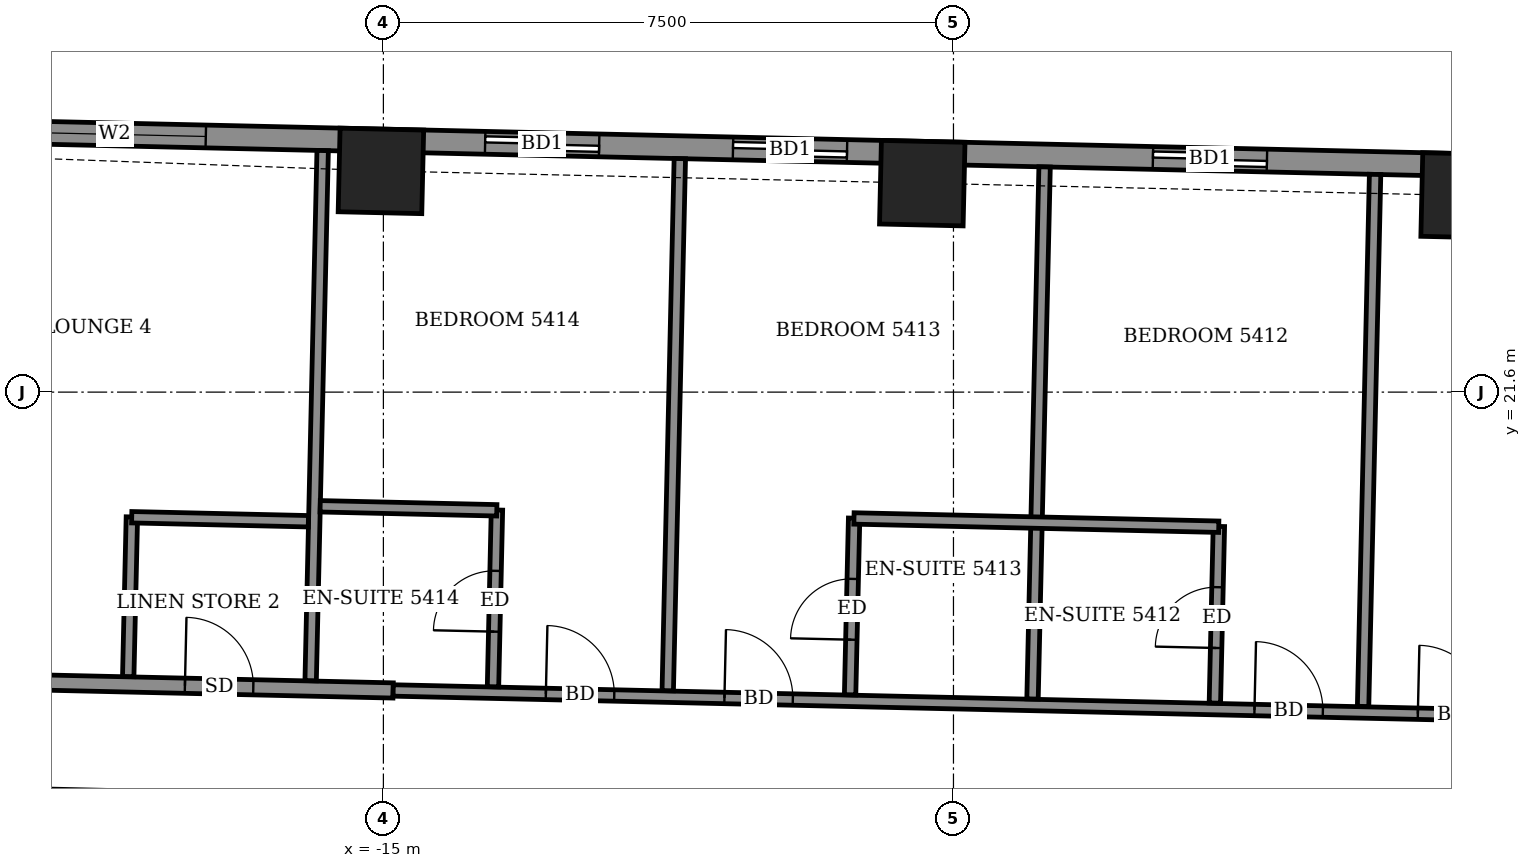
"""IFC4 building model, lengths in metres.
Left out: names, types, materials, properties, quantities, classifications, styles, units other than length and angle.
Written with IfcOpenShell. Run it as: python <this file> out.ifc"""

import sys

from ifc_helpers import new_model, si_unit, direction, frame, frame_2d, origin, origin_2d, place, context, subcontext, project, spatial, rectangle, extrude, element, fill, save


model = new_model("IFC4")
c1 = context("Model", 3, precision=1e-05, world=origin(), true_north=direction((0.0, 1.0)))
c2 = subcontext(c1, "Body", "Model", "MODEL_VIEW")
j1 = project(units=[si_unit("LENGTHUNIT", "METRE"), si_unit("PLANEANGLEUNIT", "RADIAN")], contexts=[c1])
p1 = place(None, origin())
s1 = spatial("IfcSite", under=j1, at=p1, CompositionType="ELEMENT")
p2 = place(p1, origin())
s2 = spatial("IfcBuilding", under=s1, at=p2, CompositionType="ELEMENT")
p3 = place(p2, frame((0.0, 0.0, 212.3)))
s3 = spatial("IfcBuildingStorey", under=s2, at=p3, CompositionType="ELEMENT", Elevation=212.3)
for number, where, z_axis, x_axis in (
    (1, (-0.789, 24.187, -0.55), (0.0, 0.0, 1.0), (-1.0, 0.023, 0.0)),
    (2, (-7.91, 24.349, -0.55), (0.0, 0.0, 1.0), (-1.0, 0.023, 0.0)),
    (3, (-15.032, 24.51, -0.55), (0.0, 0.0, 1.0), (-1.0, 0.023, 0.0)),
):
    element("IfcColumn", number, at=place(p3, frame(where, z_axis=z_axis, x_axis=x_axis)), inside=s3, PredefinedType="COLUMN", context=c2, shape_type="SweptSolid", body=[
        extrude(rectangle(XDim=1.1, YDim=1.1, at=origin_2d()), origin(), (0.0, 0.0, 1.0), 3.6),
    ])
p4 = place(p3, frame((20.437, 24.106, 0.0), z_axis=(0.0, 0.0, 1.0), x_axis=(-0.999742506232, 0.022691875925, 0.0)))
e4 = element("IfcWall", 4, at=p4, inside=s3, PredefinedType="SOLIDWALL", context=c2, shape_type="SweptSolid", body=[
    extrude(rectangle(XDim=42.444, YDim=0.3, at=frame_2d((21.222, 0.0))), origin(), (0.0, 0.0, 1.0), 2.55),
])
p5 = place(p4, frame((1.563, 0.0, 0.0)))
e5 = element("IfcOpeningElement", 5, at=p5, cuts=e4, PredefinedType="OPENING", context=c2, shape_type="SweptSolid", body=[
    extrude(rectangle(XDim=1.5, YDim=2.4, at=frame_2d((0.75, 1.2))), frame((0.0, 0.16, 0.0), z_axis=(0.0, -1.0, 0.0), x_axis=(1.0, 0.0, 0.0)), (0.0, 0.0, 1.0), 0.32),
])
p6 = place(p4, frame((4.584, 0.0, 0.0)))
e6 = element("IfcOpeningElement", 6, at=p6, cuts=e4, PredefinedType="OPENING", context=c2, shape_type="SweptSolid", body=[
    extrude(rectangle(XDim=1.5, YDim=2.4, at=frame_2d((0.75, 1.2))), frame((0.0, 0.16, 0.0), z_axis=(0.0, -1.0, 0.0), x_axis=(1.0, 0.0, 0.0)), (0.0, 0.0, 1.0), 0.32),
])
p7 = place(p4, frame((10.269, 0.0, 0.0)))
e7 = element("IfcOpeningElement", 7, at=p7, cuts=e4, PredefinedType="OPENING", context=c2, shape_type="SweptSolid", body=[
    extrude(rectangle(XDim=1.5, YDim=2.4, at=frame_2d((0.75, 1.2))), frame((0.0, 0.16, 0.0), z_axis=(0.0, -1.0, 0.0), x_axis=(1.0, 0.0, 0.0)), (0.0, 0.0, 1.0), 0.32),
])
p8 = place(p4, frame((15.271, 0.0, 0.0)))
e8 = element("IfcOpeningElement", 8, at=p8, cuts=e4, PredefinedType="OPENING", context=c2, shape_type="SweptSolid", body=[
    extrude(rectangle(XDim=1.5, YDim=2.4, at=frame_2d((0.75, 1.2))), frame((0.0, 0.16, 0.0), z_axis=(0.0, -1.0, 0.0), x_axis=(1.0, 0.0, 0.0)), (0.0, 0.0, 1.0), 0.32),
])
p9 = place(p4, frame((18.533, 0.0, 0.0)))
e9 = element("IfcOpeningElement", 9, at=p9, cuts=e4, PredefinedType="OPENING", context=c2, shape_type="SweptSolid", body=[
    extrude(rectangle(XDim=1.5, YDim=2.4, at=frame_2d((0.75, 1.2))), frame((0.0, 0.16, 0.0), z_axis=(0.0, -1.0, 0.0), x_axis=(1.0, 0.0, 0.0)), (0.0, 0.0, 1.0), 0.32),
])
p10 = place(p4, frame((23.819, 0.0, 0.0)))
e10 = element("IfcOpeningElement", 10, at=p10, cuts=e4, PredefinedType="OPENING", context=c2, shape_type="SweptSolid", body=[
    extrude(rectangle(XDim=1.5, YDim=2.4, at=frame_2d((0.75, 1.2))), frame((0.0, 0.16, 0.0), z_axis=(0.0, -1.0, 0.0), x_axis=(1.0, 0.0, 0.0)), (0.0, 0.0, 1.0), 0.32),
])
p11 = place(p4, frame((29.345, 0.0, 0.0)))
e11 = element("IfcOpeningElement", 11, at=p11, cuts=e4, PredefinedType="OPENING", context=c2, shape_type="SweptSolid", body=[
    extrude(rectangle(XDim=1.5, YDim=2.4, at=frame_2d((0.75, 1.2))), frame((0.0, 0.16, 0.0), z_axis=(0.0, -1.0, 0.0), x_axis=(1.0, 0.0, 0.0)), (0.0, 0.0, 1.0), 0.32),
])
p12 = place(p4, frame((32.607, 0.0, 0.0)))
e12 = element("IfcOpeningElement", 12, at=p12, cuts=e4, PredefinedType="OPENING", context=c2, shape_type="SweptSolid", body=[
    extrude(rectangle(XDim=1.5, YDim=2.4, at=frame_2d((0.75, 1.2))), frame((0.0, 0.16, 0.0), z_axis=(0.0, -1.0, 0.0), x_axis=(1.0, 0.0, 0.0)), (0.0, 0.0, 1.0), 0.32),
])
p13 = place(p4, frame((37.783, 0.0, 0.9)))
e13 = element("IfcOpeningElement", 13, at=p13, cuts=e4, PredefinedType="OPENING", context=c2, shape_type="SweptSolid", body=[
    extrude(rectangle(XDim=2.4, YDim=1.5, at=frame_2d((1.2, 0.75))), frame((0.0, 0.16, 0.0), z_axis=(0.0, -1.0, 0.0), x_axis=(1.0, 0.0, 0.0)), (0.0, 0.0, 1.0), 0.32),
])
p14 = place(p3, frame((-25.743, 16.422, 0.0), z_axis=(0.0, 0.0, 1.0), x_axis=(0.999741076645, -0.022754772455, 0.0)))
e14 = element("IfcWall", 14, at=p14, inside=s3, PredefinedType="PARTITIONING", context=c2, shape_type="SweptSolid", body=[
    extrude(rectangle(XDim=9.141, YDim=0.2, at=frame_2d((4.571, 0.0))), origin(), (0.0, 0.0, 1.0), 3.05),
])
p15 = place(p14, frame((3.371, 0.0, 0.0)))
e15 = element("IfcOpeningElement", 15, at=p15, cuts=e14, PredefinedType="OPENING", context=c2, shape_type="SweptSolid", body=[
    extrude(rectangle(XDim=1.0, YDim=2.1, at=frame_2d((0.5, 1.05))), frame((0.0, 0.11, 0.0), z_axis=(0.0, -1.0, 0.0), x_axis=(1.0, 0.0, 0.0)), (0.0, 0.0, 1.0), 0.22),
])
p16 = place(p3, frame((-25.709, 17.921, 0.0), z_axis=(0.0, 0.0, 1.0), x_axis=(0.999742764922, -0.022680475901, 0.0)))
e16 = element("IfcWall", 16, at=p16, inside=s3, PredefinedType="PARTITIONING", context=c2, shape_type="SweptSolid", body=[
    extrude(rectangle(XDim=10.84, YDim=0.2, at=frame_2d((5.42, 0.0))), origin(), (0.0, 0.0, 1.0), 3.05),
])
p17 = place(p16, frame((2.475, 0.0, 0.0)))
e17 = element("IfcOpeningElement", 17, at=p17, cuts=e16, PredefinedType="OPENING", context=c2, shape_type="SweptSolid", body=[
    extrude(rectangle(XDim=1.0, YDim=2.1, at=frame_2d((0.5, 1.05))), frame((0.0, 0.11, 0.0), z_axis=(0.0, -1.0, 0.0), x_axis=(1.0, 0.0, 0.0)), (0.0, 0.0, 1.0), 0.22),
])
p18 = place(p16, frame((8.1, 0.0, 0.0)))
e18 = element("IfcOpeningElement", 18, at=p18, cuts=e16, PredefinedType="OPENING", context=c2, shape_type="SweptSolid", body=[
    extrude(rectangle(XDim=0.9, YDim=2.1, at=frame_2d((0.45, 1.05))), frame((0.0, 0.11, 0.0), z_axis=(0.0, -1.0, 0.0), x_axis=(1.0, 0.0, 0.0)), (0.0, 0.0, 1.0), 0.22),
])
p19 = place(p3, frame((-14.871, 17.675, 0.0), z_axis=(0.0, 0.0, 1.0), x_axis=(0.999742359486, -0.02269834024, 0.0)))
e19 = element("IfcWall", 19, at=p19, inside=s3, PredefinedType="PARTITIONING", context=c2, shape_type="SweptSolid", body=[
    extrude(rectangle(XDim=30.536, YDim=0.15, at=frame_2d((15.268, 0.0))), origin(), (0.0, 0.0, 1.0), 3.05),
])
p20 = place(p19, frame((29.436, 0.0, 0.0)))
e20 = element("IfcOpeningElement", 20, at=p20, cuts=e19, PredefinedType="OPENING", context=c2, shape_type="SweptSolid", body=[
    extrude(rectangle(XDim=0.9, YDim=2.1, at=frame_2d((0.45, 1.05))), frame((0.0, 0.085, 0.0), z_axis=(0.0, -1.0, 0.0), x_axis=(1.0, 0.0, 0.0)), (0.0, 0.0, 1.0), 0.17),
])
p21 = place(p19, frame((22.484, 0.0, 0.0)))
e21 = element("IfcOpeningElement", 21, at=p21, cuts=e19, PredefinedType="OPENING", context=c2, shape_type="SweptSolid", body=[
    extrude(rectangle(XDim=0.9, YDim=2.1, at=frame_2d((0.45, 1.05))), frame((0.0, 0.085, 0.0), z_axis=(0.0, -1.0, 0.0), x_axis=(1.0, 0.0, 0.0)), (0.0, 0.0, 1.0), 0.17),
])
p22 = place(p19, frame((20.434, 0.0, 0.0)))
e22 = element("IfcOpeningElement", 22, at=p22, cuts=e19, PredefinedType="OPENING", context=c2, shape_type="SweptSolid", body=[
    extrude(rectangle(XDim=0.9, YDim=2.1, at=frame_2d((0.45, 1.05))), frame((0.0, 0.085, 0.0), z_axis=(0.0, -1.0, 0.0), x_axis=(1.0, 0.0, 0.0)), (0.0, 0.0, 1.0), 0.17),
])
p23 = place(p19, frame((13.484, 0.0, 0.0)))
e23 = element("IfcOpeningElement", 23, at=p23, cuts=e19, PredefinedType="OPENING", context=c2, shape_type="SweptSolid", body=[
    extrude(rectangle(XDim=0.9, YDim=2.1, at=frame_2d((0.45, 1.05))), frame((0.0, 0.085, 0.0), z_axis=(0.0, -1.0, 0.0), x_axis=(1.0, 0.0, 0.0)), (0.0, 0.0, 1.0), 0.17),
])
p24 = place(p19, frame((11.334, 0.0, 0.0)))
e24 = element("IfcOpeningElement", 24, at=p24, cuts=e19, PredefinedType="OPENING", context=c2, shape_type="SweptSolid", body=[
    extrude(rectangle(XDim=0.9, YDim=2.1, at=frame_2d((0.45, 1.05))), frame((0.0, 0.085, 0.0), z_axis=(0.0, -1.0, 0.0), x_axis=(1.0, 0.0, 0.0)), (0.0, 0.0, 1.0), 0.17),
])
p25 = place(p19, frame((4.359, 0.0, 0.0)))
e25 = element("IfcOpeningElement", 25, at=p25, cuts=e19, PredefinedType="OPENING", context=c2, shape_type="SweptSolid", body=[
    extrude(rectangle(XDim=0.9, YDim=2.1, at=frame_2d((0.45, 1.05))), frame((0.0, 0.085, 0.0), z_axis=(0.0, -1.0, 0.0), x_axis=(1.0, 0.0, 0.0)), (0.0, 0.0, 1.0), 0.17),
])
p26 = place(p19, frame((2.009, 0.0, 0.0)))
e26 = element("IfcOpeningElement", 26, at=p26, cuts=e19, PredefinedType="OPENING", context=c2, shape_type="SweptSolid", body=[
    extrude(rectangle(XDim=0.9, YDim=2.1, at=frame_2d((0.45, 1.05))), frame((0.0, 0.085, 0.0), z_axis=(0.0, -1.0, 0.0), x_axis=(1.0, 0.0, 0.0)), (0.0, 0.0, 1.0), 0.17),
])
p27 = place(p3, frame((-18.357, 17.858, 0.0), z_axis=(0.0, 0.0, 1.0), x_axis=(0.022779486249, 0.999740513837, 0.0)))
e27 = element("IfcWall", 27, at=p27, inside=s3, PredefinedType="PARTITIONING", context=c2, shape_type="SweptSolid", body=[
    extrude(rectangle(XDim=2.101, YDim=0.15, at=frame_2d((1.05, 0.0))), origin(), (0.0, 0.0, 1.0), 3.05),
])
p28 = place(p3, frame((-15.957, 17.804, 0.0), z_axis=(0.0, 0.0, 1.0), x_axis=(0.022643496158, 0.999743603171, 0.0)))
e28 = element("IfcWall", 28, at=p28, inside=s3, PredefinedType="PARTITIONING", context=c2, shape_type="SweptSolid", body=[
    extrude(rectangle(XDim=6.976, YDim=0.15, at=frame_2d((3.488, 0.0))), origin(), (0.0, 0.0, 1.0), 2.55),
])
p29 = place(p3, frame((-13.558, 17.724, 0.0), z_axis=(0.0, 0.0, 1.0), x_axis=(0.022361308448, 0.999749954681, 0.0)))
e29 = element("IfcWall", 29, at=p29, inside=s3, PredefinedType="PARTITIONING", context=c2, shape_type="SweptSolid", body=[
    extrude(rectangle(XDim=2.325, YDim=0.15, at=frame_2d((1.163, 0.0))), origin(), (0.0, 0.0, 1.0), 3.05),
])
p30 = place(p29, frame((0.725, 0.0, 0.0)))
e30 = element("IfcOpeningElement", 30, at=p30, cuts=e29, PredefinedType="OPENING", context=c2, shape_type="SweptSolid", body=[
    extrude(rectangle(XDim=0.8, YDim=2.1, at=frame_2d((0.4, 1.05))), frame((0.0, 0.085, 0.0), z_axis=(0.0, -1.0, 0.0), x_axis=(1.0, 0.0, 0.0)), (0.0, 0.0, 1.0), 0.17),
])
p31 = place(p3, frame((-11.259, 17.672, 0.0), z_axis=(0.0, 0.0, 1.0), x_axis=(0.022699227919, 0.999742339331, 0.0)))
e31 = element("IfcWall", 31, at=p31, inside=s3, PredefinedType="PARTITIONING", context=c2, shape_type="SweptSolid", body=[
    extrude(rectangle(XDim=7.002, YDim=0.15, at=frame_2d((3.501, 0.0))), origin(), (0.0, 0.0, 1.0), 2.5),
])
p32 = place(p3, frame((-8.86, 17.618, 0.0), z_axis=(0.0, 0.0, 1.0), x_axis=(0.022895561926, 0.999737862264, 0.0)))
e32 = element("IfcWall", 32, at=p32, inside=s3, PredefinedType="PARTITIONING", context=c2, shape_type="SweptSolid", body=[
    extrude(rectangle(XDim=2.324, YDim=0.15, at=frame_2d((1.162, 0.0))), origin(), (0.0, 0.0, 1.0), 3.05),
])
p33 = place(p32, frame((0.725, 0.0, 0.0)))
e33 = element("IfcOpeningElement", 33, at=p33, cuts=e32, PredefinedType="OPENING", context=c2, shape_type="SweptSolid", body=[
    extrude(rectangle(XDim=0.8, YDim=2.1, at=frame_2d((0.4, 1.05))), frame((0.0, 0.085, 0.0), z_axis=(0.0, -1.0, 0.0), x_axis=(1.0, 0.0, 0.0)), (0.0, 0.0, 1.0), 0.17),
])
p34 = place(p3, frame((-6.46, 17.563, 0.0), z_axis=(0.0, 0.0, 1.0), x_axis=(0.022699227919, 0.999742339331, 0.0)))
e34 = element("IfcWall", 34, at=p34, inside=s3, PredefinedType="PARTITIONING", context=c2, shape_type="SweptSolid", body=[
    extrude(rectangle(XDim=7.002, YDim=0.15, at=frame_2d((3.501, 0.0))), origin(), (0.0, 0.0, 1.0), 2.5),
])
p35 = place(p3, frame((-4.061, 17.509, 0.0), z_axis=(0.0, 0.0, 1.0), x_axis=(0.02279059109, 0.999740260747, 0.0)))
e35 = element("IfcWall", 35, at=p35, inside=s3, PredefinedType="PARTITIONING", context=c2, shape_type="SweptSolid", body=[
    extrude(rectangle(XDim=2.324, YDim=0.15, at=frame_2d((1.162, 0.0))), origin(), (0.0, 0.0, 1.0), 3.05),
])
p36 = place(p35, frame((0.725, 0.0, 0.0)))
e36 = element("IfcOpeningElement", 36, at=p36, cuts=e35, PredefinedType="OPENING", context=c2, shape_type="SweptSolid", body=[
    extrude(rectangle(XDim=0.8, YDim=2.1, at=frame_2d((0.4, 1.05))), frame((0.0, 0.085, 0.0), z_axis=(0.0, -1.0, 0.0), x_axis=(1.0, 0.0, 0.0)), (0.0, 0.0, 1.0), 0.17),
])
p37 = place(p3, frame((-2.111, 17.465, 0.0), z_axis=(0.0, 0.0, 1.0), x_axis=(0.022597827698, 0.999744636486, 0.0)))
e37 = element("IfcWall", 37, at=p37, inside=s3, PredefinedType="PARTITIONING", context=c2, shape_type="SweptSolid", body=[
    extrude(rectangle(XDim=7.001, YDim=0.15, at=frame_2d((3.5, 0.0))), origin(), (0.0, 0.0, 1.0), 2.5),
])
for number, where, z_axis, x_axis in (
    (38, (-18.311, 19.954, 0.0), (0.0, 0.0, 1.0), (1.0, -0.023, 0.0)),
    (39, (-15.832, 20.098, 0.0), (0.0, 0.0, 1.0), (1.0, -0.023, 0.0)),
):
    element("IfcWall", number, at=place(p3, frame(where, z_axis=z_axis, x_axis=x_axis)), inside=s3, PredefinedType="PARTITIONING", context=c2, shape_type="SweptSolid", body=[
        extrude(rectangle(XDim=2.324, YDim=0.15, at=frame_2d((1.162, 0.0))), origin(), (0.0, 0.0, 1.0), 3.05),
    ])
p38 = place(p3, frame((-8.809, 19.938, 0.0), z_axis=(0.0, 0.0, 1.0), x_axis=(0.999742701292, -0.022683280499, 0.0)))
e40 = element("IfcWall", 40, at=p38, inside=s3, PredefinedType="PARTITIONING", context=c2, shape_type="SweptSolid", body=[
    extrude(rectangle(XDim=4.8, YDim=0.15, at=frame_2d((2.4, 0.0))), origin(), (0.0, 0.0, 1.0), 3.05),
])
p39 = place(p10, origin())
e41 = element("IfcDoor", 41, at=p39, inside=s3, OperationType="SLIDING_TO_LEFT", PredefinedType="DOOR", context=c2, shape_type="SweptSolid", body=[
    extrude(rectangle(XDim=1.5, YDim=2.4, at=frame_2d((0.75, 1.2))), frame((0.0, 0.025, 0.0), z_axis=(0.0, -1.0, 0.0), x_axis=(1.0, 0.0, 0.0)), (0.0, 0.0, 1.0), 0.05),
])
fill(e10, e41)
p40 = place(p11, origin())
e42 = element("IfcDoor", 42, at=p40, inside=s3, OperationType="SLIDING_TO_LEFT", PredefinedType="DOOR", context=c2, shape_type="SweptSolid", body=[
    extrude(rectangle(XDim=1.5, YDim=2.4, at=frame_2d((0.75, 1.2))), frame((0.0, 0.025, 0.0), z_axis=(0.0, -1.0, 0.0), x_axis=(1.0, 0.0, 0.0)), (0.0, 0.0, 1.0), 0.05),
])
fill(e11, e42)
p41 = place(p12, origin())
e43 = element("IfcDoor", 43, at=p41, inside=s3, OperationType="SLIDING_TO_LEFT", PredefinedType="DOOR", context=c2, shape_type="SweptSolid", body=[
    extrude(rectangle(XDim=1.5, YDim=2.4, at=frame_2d((0.75, 1.2))), frame((0.0, 0.025, 0.0), z_axis=(0.0, -1.0, 0.0), x_axis=(1.0, 0.0, 0.0)), (0.0, 0.0, 1.0), 0.05),
])
fill(e12, e43)
p42 = place(p13, origin())
e44 = element("IfcWindow", 44, at=p42, inside=s3, PartitioningType="DOUBLE_PANEL_VERTICAL", PredefinedType="WINDOW", context=c2, shape_type="SweptSolid", body=[
    extrude(rectangle(XDim=2.4, YDim=1.5, at=frame_2d((1.2, 0.75))), frame((0.0, 0.03, 0.0), z_axis=(0.0, -1.0, 0.0), x_axis=(1.0, 0.0, 0.0)), (0.0, 0.0, 1.0), 0.06),
])
fill(e13, e44)
p43 = place(p23, origin())
e45 = element("IfcDoor", 45, at=p43, inside=s3, OperationType="SINGLE_SWING_LEFT", PredefinedType="DOOR", context=c2, shape_type="SweptSolid", body=[
    extrude(rectangle(XDim=0.9, YDim=2.1, at=frame_2d((0.45, 1.05))), frame((0.0, 0.025, 0.0), z_axis=(0.0, -1.0, 0.0), x_axis=(1.0, 0.0, 0.0)), (0.0, 0.0, 1.0), 0.05),
])
fill(e23, e45)
p44 = place(p24, origin())
e46 = element("IfcDoor", 46, at=p44, inside=s3, OperationType="SINGLE_SWING_RIGHT", PredefinedType="DOOR", context=c2, shape_type="SweptSolid", body=[
    extrude(rectangle(XDim=0.9, YDim=2.1, at=frame_2d((0.45, 1.05))), frame((0.0, 0.025, 0.0), z_axis=(0.0, -1.0, 0.0), x_axis=(1.0, 0.0, 0.0)), (0.0, 0.0, 1.0), 0.05),
])
fill(e24, e46)
p45 = place(p36, origin())
e47 = element("IfcDoor", 47, at=p45, inside=s3, OperationType="SINGLE_SWING_RIGHT", PredefinedType="DOOR", context=c2, shape_type="SweptSolid", body=[
    extrude(rectangle(XDim=0.8, YDim=2.1, at=frame_2d((0.4, 1.05))), frame((0.0, 0.025, 0.0), z_axis=(0.0, -1.0, 0.0), x_axis=(1.0, 0.0, 0.0)), (0.0, 0.0, 1.0), 0.05),
])
fill(e36, e47)
p46 = place(p25, origin())
e48 = element("IfcDoor", 48, at=p46, inside=s3, OperationType="SINGLE_SWING_LEFT", PredefinedType="DOOR", context=c2, shape_type="SweptSolid", body=[
    extrude(rectangle(XDim=0.9, YDim=2.1, at=frame_2d((0.45, 1.05))), frame((0.0, 0.025, 0.0), z_axis=(0.0, -1.0, 0.0), x_axis=(1.0, 0.0, 0.0)), (0.0, 0.0, 1.0), 0.05),
])
fill(e25, e48)
p47 = place(p33, origin())
e49 = element("IfcDoor", 49, at=p47, inside=s3, OperationType="SINGLE_SWING_LEFT", PredefinedType="DOOR", context=c2, shape_type="SweptSolid", body=[
    extrude(rectangle(XDim=0.8, YDim=2.1, at=frame_2d((0.4, 1.05))), frame((0.0, 0.025, 0.0), z_axis=(0.0, -1.0, 0.0), x_axis=(1.0, 0.0, 0.0)), (0.0, 0.0, 1.0), 0.05),
])
fill(e33, e49)
p48 = place(p26, origin())
e50 = element("IfcDoor", 50, at=p48, inside=s3, OperationType="SINGLE_SWING_RIGHT", PredefinedType="DOOR", context=c2, shape_type="SweptSolid", body=[
    extrude(rectangle(XDim=0.9, YDim=2.1, at=frame_2d((0.45, 1.05))), frame((0.0, 0.025, 0.0), z_axis=(0.0, -1.0, 0.0), x_axis=(1.0, 0.0, 0.0)), (0.0, 0.0, 1.0), 0.05),
])
fill(e26, e50)
p49 = place(p30, origin())
e51 = element("IfcDoor", 51, at=p49, inside=s3, OperationType="SINGLE_SWING_RIGHT", PredefinedType="DOOR", context=c2, shape_type="SweptSolid", body=[
    extrude(rectangle(XDim=0.8, YDim=2.1, at=frame_2d((0.4, 1.05))), frame((0.0, 0.025, 0.0), z_axis=(0.0, -1.0, 0.0), x_axis=(1.0, 0.0, 0.0)), (0.0, 0.0, 1.0), 0.05),
])
fill(e30, e51)
p50 = place(p18, origin())
e52 = element("IfcDoor", 52, at=p50, inside=s3, OperationType="SINGLE_SWING_LEFT", PredefinedType="DOOR", context=c2, shape_type="SweptSolid", body=[
    extrude(rectangle(XDim=0.9, YDim=2.1, at=frame_2d((0.45, 1.05))), frame((0.0, 0.025, 0.0), z_axis=(0.0, -1.0, 0.0), x_axis=(1.0, 0.0, 0.0)), (0.0, 0.0, 1.0), 0.05),
])
fill(e18, e52)
save(model, sys.argv[1])
